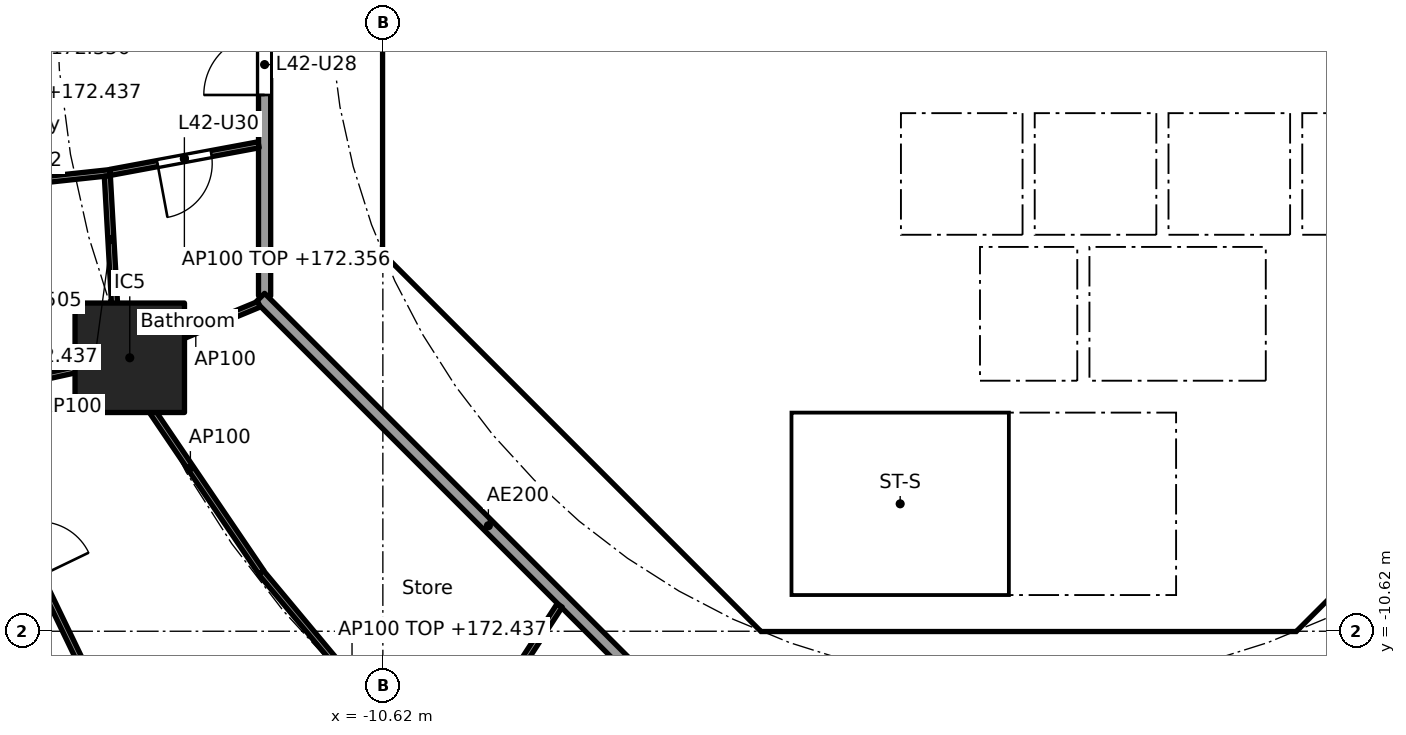
"""IFC4 building model, lengths in metres.
Left out: names, types, materials, properties, quantities, classifications, styles, units other than length and angle.
Written with IfcOpenShell. Run it as: python <this file> out.ifc"""

import sys

from ifc_helpers import new_model, si_unit, direction, frame, frame_2d, origin, origin_2d, place, context, subcontext, project, spatial, polyline, rectangle, outline, extrude, element, fill, save


model = new_model("IFC4")
c1 = context("Model", 3, precision=1e-05, world=origin(), true_north=direction((0.0, 1.0)))
c2 = subcontext(c1, "Body", "Model", "MODEL_VIEW")
j1 = project(units=[si_unit("LENGTHUNIT", "METRE"), si_unit("PLANEANGLEUNIT", "RADIAN")], contexts=[c1])
p1 = place(None, origin())
s1 = spatial("IfcSite", under=j1, at=p1, CompositionType="ELEMENT")
p2 = place(p1, origin())
s2 = spatial("IfcBuilding", under=s1, at=p2, CompositionType="ELEMENT")
p3 = place(p2, frame((0.0, 0.0, 169.6)))
s3 = spatial("IfcBuildingStorey", under=s2, at=p3, CompositionType="ELEMENT", Elevation=169.6)
p4 = place(p3, frame((-14.782, -6.123, 0.0), z_axis=(0.0, 0.0, 1.0), x_axis=(1.0, 0.0, 0.0)))
e1 = element("IfcColumn", 1, at=p4, inside=s3, PredefinedType="COLUMN", context=c2, shape_type="SweptSolid", body=[
    extrude(rectangle(XDim=1.8, YDim=1.8, at=origin_2d()), origin(), (0.0, 0.0, 1.0), 3.7),
])
p5 = place(p3, frame((-10.325, 3.801, 0.0), z_axis=(0.0, 0.0, 1.0), x_axis=(0.0, -1.0, 0.0)))
e2 = element("IfcWall", 2, at=p5, inside=s3, PredefinedType="SHEAR", context=c2, shape_type="SweptSolid", body=[
    extrude(rectangle(XDim=7.602, YDim=0.6, at=frame_2d((3.801, 0.0))), origin(), (0.0, 0.0, 1.0), 3.44),
])
p6 = place(p5, frame((0.651, 0.0, 0.0)))
e3 = element("IfcOpeningElement", 3, at=p6, cuts=e2, PredefinedType="OPENING", context=c2, shape_type="SweptSolid", body=[
    extrude(rectangle(XDim=1.5, YDim=2.1, at=frame_2d((0.75, 1.05))), frame((0.0, 0.31, 0.0), z_axis=(0.0, -1.0, 0.0), x_axis=(1.0, 0.0, 0.0)), (0.0, 0.0, 1.0), 0.62),
])
p7 = place(p5, frame((5.451, 0.0, 0.0)))
e4 = element("IfcOpeningElement", 4, at=p7, cuts=e2, PredefinedType="OPENING", context=c2, shape_type="SweptSolid", body=[
    extrude(rectangle(XDim=1.5, YDim=2.1, at=frame_2d((0.75, 1.05))), frame((0.0, 0.31, 0.0), z_axis=(0.0, -1.0, 0.0), x_axis=(1.0, 0.0, 0.0)), (0.0, 0.0, 1.0), 0.62),
])
p8 = place(p3, frame((-9.988, -4.613, 0.0), z_axis=(0.0, 0.0, 1.0), x_axis=(0.707106781187, -0.707106781187, 0.0)))
e5 = element("IfcWall", 5, at=p8, inside=s3, PredefinedType="SHEAR", context=c2, shape_type="SweptSolid", body=[
    extrude(rectangle(XDim=7.602, YDim=0.6, at=frame_2d((3.801, 0.0))), origin(), (0.0, 0.0, 1.0), 3.44),
])
p9 = place(p8, frame((6.151, 0.0, 0.0)))
e6 = element("IfcOpeningElement", 6, at=p9, cuts=e5, PredefinedType="OPENING", context=c2, shape_type="SweptSolid", body=[
    extrude(rectangle(XDim=1.1, YDim=2.1, at=frame_2d((0.55, 1.05))), frame((0.0, 0.31, 0.0), z_axis=(0.0, -1.0, 0.0), x_axis=(1.0, 0.0, 0.0)), (0.0, 0.0, 1.0), 0.62),
])
p10 = place(p3, frame((4.613, -9.988, 0.0), z_axis=(0.0, 0.0, 1.0), x_axis=(0.707106781187, 0.707106781187, 0.0)))
e7 = element("IfcWall", 7, at=p10, inside=s3, PredefinedType="SHEAR", context=c2, shape_type="SweptSolid", body=[
    extrude(rectangle(XDim=7.602, YDim=0.6, at=frame_2d((3.801, 0.0))), origin(), (0.0, 0.0, 1.0), 3.44),
])
p11 = place(p10, frame((3.201, 0.0, 0.0)))
e8 = element("IfcOpeningElement", 8, at=p11, cuts=e7, PredefinedType="OPENING", context=c2, shape_type="SweptSolid", body=[
    extrude(rectangle(XDim=1.2, YDim=2.1, at=frame_2d((0.6, 1.05))), frame((0.0, 0.31, 0.0), z_axis=(0.0, -1.0, 0.0), x_axis=(1.0, 0.0, 0.0)), (0.0, 0.0, 1.0), 0.62),
])
p12 = place(p3, frame((4.0, -10.025, 0.0), z_axis=(0.0, 0.0, 1.0), x_axis=(0.0, 1.0, 0.0)))
e9 = element("IfcWall", 9, at=p12, inside=s3, PredefinedType="SOLIDWALL", context=c2, shape_type="SweptSolid", body=[
    extrude(rectangle(XDim=3.0, YDim=0.2, at=frame_2d((1.5, 0.0))), origin(), (0.0, 0.0, 1.0), 3.44),
])
p13 = place(p12, frame((0.975, 0.0, 0.0)))
e10 = element("IfcOpeningElement", 10, at=p13, cuts=e9, PredefinedType="OPENING", context=c2, shape_type="SweptSolid", body=[
    extrude(rectangle(XDim=1.1, YDim=2.1, at=frame_2d((0.55, 1.05))), frame((0.0, 0.11, 0.0), z_axis=(0.0, -1.0, 0.0), x_axis=(1.0, 0.0, 0.0)), (0.0, 0.0, 1.0), 0.22),
])
p14 = place(p3, frame((-5.8, -8.227, 0.0), z_axis=(0.0, 0.0, 1.0), x_axis=(0.0, 1.0, 0.0)))
e11 = element("IfcWall", 11, at=p14, inside=s3, PredefinedType="PARTITIONING", context=c2, shape_type="SweptSolid", body=[
    extrude(rectangle(XDim=3.927, YDim=0.15, at=frame_2d((1.963, 0.0))), origin(), (0.0, 0.0, 1.0), 3.44),
])
p15 = place(p14, frame((2.764, 0.0, 0.0)))
e12 = element("IfcOpeningElement", 12, at=p15, cuts=e11, PredefinedType="OPENING", context=c2, shape_type="SweptSolid", body=[
    extrude(rectangle(XDim=0.9, YDim=2.1, at=frame_2d((0.45, 1.05))), frame((0.0, 0.085, 0.0), z_axis=(0.0, -1.0, 0.0), x_axis=(1.0, 0.0, 0.0)), (0.0, 0.0, 1.0), 0.17),
])
p16 = place(p14, frame((0.688, 0.0, 0.0)))
e13 = element("IfcOpeningElement", 13, at=p16, cuts=e11, PredefinedType="OPENING", context=c2, shape_type="SweptSolid", body=[
    extrude(rectangle(XDim=0.9, YDim=2.1, at=frame_2d((0.45, 1.05))), frame((0.0, 0.085, 0.0), z_axis=(0.0, -1.0, 0.0), x_axis=(1.0, 0.0, 0.0)), (0.0, 0.0, 1.0), 0.17),
])
p17 = place(p3, frame((4.0, -6.5, 0.0), z_axis=(0.0, 0.0, 1.0), x_axis=(0.0, 1.0, 0.0)))
e14 = element("IfcWall", 14, at=p17, inside=s3, PredefinedType="SOLIDWALL", context=c2, shape_type="SweptSolid", body=[
    extrude(rectangle(XDim=2.2, YDim=0.2, at=frame_2d((1.1, 0.0))), origin(), (0.0, 0.0, 1.0), 3.44),
])
p18 = place(p17, frame((0.55, 0.0, 0.0)))
e15 = element("IfcOpeningElement", 15, at=p18, cuts=e14, PredefinedType="OPENING", context=c2, shape_type="SweptSolid", body=[
    extrude(rectangle(XDim=1.1, YDim=2.1, at=frame_2d((0.55, 1.05))), frame((0.0, 0.11, 0.0), z_axis=(0.0, -1.0, 0.0), x_axis=(1.0, 0.0, 0.0)), (0.0, 0.0, 1.0), 0.22),
])
p19 = place(p3, frame((-4.0, -6.5, 0.0), z_axis=(0.0, 0.0, 1.0), x_axis=(0.0, 1.0, 0.0)))
e16 = element("IfcWall", 16, at=p19, inside=s3, PredefinedType="SOLIDWALL", context=c2, shape_type="SweptSolid", body=[
    extrude(rectangle(XDim=2.2, YDim=0.2, at=frame_2d((1.1, 0.0))), origin(), (0.0, 0.0, 1.0), 3.44),
])
p20 = place(p19, frame((0.65, 0.0, 0.0)))
e17 = element("IfcOpeningElement", 17, at=p20, cuts=e16, PredefinedType="OPENING", context=c2, shape_type="SweptSolid", body=[
    extrude(rectangle(XDim=0.9, YDim=2.1, at=frame_2d((0.45, 1.05))), frame((0.0, 0.11, 0.0), z_axis=(0.0, -1.0, 0.0), x_axis=(1.0, 0.0, 0.0)), (0.0, 0.0, 1.0), 0.22),
])
p21 = place(p3, frame((-6.7, -2.0, 0.0), z_axis=(0.0, 0.0, 1.0), x_axis=(1.0, 0.0, 0.0)))
e18 = element("IfcWall", 18, at=p21, inside=s3, PredefinedType="SOLIDWALL", context=c2, shape_type="SweptSolid", body=[
    extrude(rectangle(XDim=13.4, YDim=0.2, at=frame_2d((6.7, 0.0))), origin(), (0.0, 0.0, 1.0), 3.44),
])
p22 = place(p21, frame((5.05, 0.0, 0.0)))
e19 = element("IfcOpeningElement", 19, at=p22, cuts=e18, PredefinedType="OPENING", context=c2, shape_type="SweptSolid", body=[
    extrude(rectangle(XDim=1.1, YDim=2.1, at=frame_2d((0.55, 1.05))), frame((0.0, 0.11, 0.0), z_axis=(0.0, -1.0, 0.0), x_axis=(1.0, 0.0, 0.0)), (0.0, 0.0, 1.0), 0.22),
])
p23 = place(p21, frame((7.25, 0.0, 0.0)))
e20 = element("IfcOpeningElement", 20, at=p23, cuts=e18, PredefinedType="OPENING", context=c2, shape_type="SweptSolid", body=[
    extrude(rectangle(XDim=1.1, YDim=2.1, at=frame_2d((0.55, 1.05))), frame((0.0, 0.11, 0.0), z_axis=(0.0, -1.0, 0.0), x_axis=(1.0, 0.0, 0.0)), (0.0, 0.0, 1.0), 0.22),
])
p24 = place(p21, frame((1.85, 0.0, 0.0)))
e21 = element("IfcOpeningElement", 21, at=p24, cuts=e18, PredefinedType="OPENING", context=c2, shape_type="SweptSolid", body=[
    extrude(rectangle(XDim=0.9, YDim=2.1, at=frame_2d((0.45, 1.05))), frame((0.0, 0.11, 0.0), z_axis=(0.0, -1.0, 0.0), x_axis=(1.0, 0.0, 0.0)), (0.0, 0.0, 1.0), 0.22),
])
p25 = place(p3, origin())
e22 = element("IfcWall", 22, at=p25, inside=s3, PredefinedType="SHEAR", context=c2, shape_type="SweptSolid", body=[
    extrude(outline(polyline([(-10.625, -3.801), (-10.025, -3.801), (-10.025, -4.152), (-9.776, -4.401), (-10.2, -4.825), (-10.625, -4.401), (-10.625, -3.801)])), origin(), (0.0, 0.0, 1.0), 3.44),
])
p26 = place(p3, origin())
e23 = element("IfcWall", 23, at=p26, inside=s3, PredefinedType="SHEAR", context=c2, shape_type="SweptSolid", body=[
    extrude(outline(polyline([(-4.152, -10.025), (4.152, -10.025), (4.401, -9.776), (4.825, -10.2), (4.401, -10.625), (-4.401, -10.625), (-4.825, -10.2), (-4.401, -9.776), (-4.152, -10.025)])), origin(), (0.0, 0.0, 1.0), 3.44),
])
for number, where, z_axis, x_axis in (
    (24, (-0.9, -6.5, 0.0), (0.0, 0.0, 1.0), (0.0, 1.0, 0.0)),
    (25, (0.9, -6.5, 0.0), (0.0, 0.0, 1.0), (0.0, 1.0, 0.0)),
):
    element("IfcWall", number, at=place(p3, frame(where, z_axis=z_axis, x_axis=x_axis)), inside=s3, PredefinedType="SOLIDWALL", context=c2, shape_type="SweptSolid", body=[
        extrude(rectangle(XDim=2.2, YDim=0.2, at=frame_2d((1.1, 0.0))), origin(), (0.0, 0.0, 1.0), 3.44),
    ])
p27 = place(p3, origin())
e26 = element("IfcWall", 26, at=p27, inside=s3, PredefinedType="SOLIDWALL", context=c2, shape_type="SweptSolid", body=[
    extrude(outline(polyline([(-6.7, -2.1), (-6.5, -2.1), (-6.5, -4.1), (-2.3, -4.1), (-2.3, -2.1), (-2.1, -2.1), (-2.1, -4.1), (-0.1, -4.1), (-0.1, -2.1), (0.1, -2.1), (0.1, -4.1), (2.1, -4.1), (2.1, -2.1), (2.3, -2.1), (2.3, -4.1), (4.3, -4.1), (4.3, -2.1), (4.5, -2.1), (4.5, -4.1), (6.5, -4.1), (6.5, -2.1), (6.7, -2.1), (6.7, -4.3), (-6.7, -4.3), (-6.7, -2.1)])), origin(), (0.0, 0.0, 1.0), 3.44),
])
p28 = place(p3, frame((-10.025, -4.0, 0.0), z_axis=(0.0, 0.0, 1.0), x_axis=(1.0, 0.0, 0.0)))
e27 = element("IfcWall", 27, at=p28, inside=s3, PredefinedType="PARTITIONING", context=c2, shape_type="SweptSolid", body=[
    extrude(rectangle(XDim=3.325, YDim=0.2, at=frame_2d((1.662, 0.0))), origin(), (0.0, 0.0, 1.0), 3.44),
])
p29 = place(p3, frame((-8.301, -5.8, 0.0), z_axis=(0.0, 0.0, 1.0), x_axis=(1.0, 0.0, 0.0)))
e28 = element("IfcWall", 28, at=p29, inside=s3, PredefinedType="PARTITIONING", context=c2, shape_type="SweptSolid", body=[
    extrude(rectangle(XDim=2.426, YDim=0.15, at=frame_2d((1.213, 0.0))), origin(), (0.0, 0.0, 1.0), 3.44),
])
p30 = place(p3, origin())
e29 = element("IfcWall", 29, at=p30, inside=s3, PredefinedType="SOLIDWALL", context=c2, shape_type="SweptSolid", body=[
    extrude(outline(polyline([(-3.9, -10.025), (-4.1, -10.025), (-4.1, -7.025), (-3.9, -7.025), (-3.9, -10.025)])), origin(), (0.0, 0.0, 1.0), 3.44),
])
p31 = place(p3, origin())
e30 = element("IfcWall", 30, at=p31, inside=s3, PredefinedType="SOLIDWALL", context=c2, shape_type="SweptSolid", body=[
    extrude(outline(polyline([(4.1, -7.025), (-4.1, -7.025), (-4.1, -6.5), (4.1, -6.5), (4.1, -7.025)])), origin(), (0.0, 0.0, 1.0), 3.44),
])
p32 = place(p3, frame((-12.565, 5.304, 0.0), z_axis=(0.0, 0.0, 1.0), x_axis=(0.0, -1.0, 0.0)))
e31 = element("IfcWall", 31, at=p32, inside=s3, PredefinedType="PARTITIONING", context=c2, shape_type="SweptSolid", body=[
    extrude(rectangle(XDim=10.409, YDim=0.2, at=frame_2d((5.205, 0.0))), origin(), (0.0, 0.0, 1.0), 3.44),
])
p33 = place(p32, frame((6.106, 0.0, 0.0)))
e32 = element("IfcOpeningElement", 32, at=p33, cuts=e31, PredefinedType="OPENING", context=c2, shape_type="SweptSolid", body=[
    extrude(rectangle(XDim=1.0, YDim=2.1, at=frame_2d((0.5, 1.05))), frame((0.0, 0.11, 0.0), z_axis=(0.0, -1.0, 0.0), x_axis=(1.0, 0.0, 0.0)), (0.0, 0.0, 1.0), 0.22),
])
p34 = place(p3, frame((-12.635, -5.134, 0.0), z_axis=(0.0, 0.0, 1.0), x_axis=(0.707106781187, -0.707106781187, 0.0)))
e33 = element("IfcWall", 33, at=p34, inside=s3, PredefinedType="PARTITIONING", context=c2, shape_type="SweptSolid", body=[
    extrude(rectangle(XDim=10.609, YDim=0.2, at=frame_2d((5.305, 0.0))), origin(), (0.0, 0.0, 1.0), 3.44),
])
p35 = place(p3, frame((-12.663, -2.621, 0.0), z_axis=(0.0, 0.0, 1.0), x_axis=(-0.983176884312, -0.182655999505, 0.0)))
e34 = element("IfcWall", 34, at=p35, inside=s3, PredefinedType="PARTITIONING", context=c2, shape_type="SweptSolid", body=[
    extrude(rectangle(XDim=2.483, YDim=0.1, at=frame_2d((1.242, 0.0))), origin(), (0.0, 0.0, 1.0), 2.756),
])
p36 = place(p35, frame((0.792, 0.0, 0.0)))
e35 = element("IfcOpeningElement", 35, at=p36, cuts=e34, PredefinedType="OPENING", context=c2, shape_type="SweptSolid", body=[
    extrude(rectangle(XDim=0.9, YDim=2.1, at=frame_2d((0.45, 1.05))), frame((0.0, 0.06, 0.0), z_axis=(0.0, -1.0, 0.0), x_axis=(1.0, 0.0, 0.0)), (0.0, 0.0, 1.0), 0.12),
])
p37 = place(p3, frame((-15.104, -3.078, 0.0), z_axis=(0.0, 0.0, 1.0), x_axis=(-0.994316167803, -0.106467640365, 0.0)))
e36 = element("IfcWall", 36, at=p37, inside=s3, PredefinedType="PARTITIONING", context=c2, shape_type="SweptSolid", body=[
    extrude(rectangle(XDim=6.45, YDim=0.1, at=frame_2d((3.225, 0.0))), origin(), (0.0, 0.0, 1.0), 2.905),
])
p38 = place(p37, frame((1.022, 0.0, 0.0)))
e37 = element("IfcOpeningElement", 37, at=p38, cuts=e36, PredefinedType="OPENING", context=c2, shape_type="SweptSolid", body=[
    extrude(rectangle(XDim=0.9, YDim=2.1, at=frame_2d((0.45, 1.05))), frame((0.0, 0.06, 0.0), z_axis=(0.0, -1.0, 0.0), x_axis=(1.0, 0.0, 0.0)), (0.0, 0.0, 1.0), 0.12),
])
p39 = place(p37, frame((4.223, 0.0, 0.0)))
e38 = element("IfcOpeningElement", 38, at=p39, cuts=e36, PredefinedType="OPENING", context=c2, shape_type="SweptSolid", body=[
    extrude(rectangle(XDim=0.9, YDim=2.1, at=frame_2d((0.45, 1.05))), frame((0.0, 0.06, 0.0), z_axis=(0.0, -1.0, 0.0), x_axis=(1.0, 0.0, 0.0)), (0.0, 0.0, 1.0), 0.12),
])
p40 = place(p3, frame((-15.151, -3.133, 0.0), z_axis=(0.0, 0.0, 1.0), x_axis=(0.05637501378, -0.998409664327, 0.0)))
e39 = element("IfcWall", 39, at=p40, inside=s3, PredefinedType="PARTITIONING", context=c2, shape_type="SweptSolid", body=[
    extrude(rectangle(XDim=2.988, YDim=0.1, at=frame_2d((1.494, 0.0))), origin(), (0.0, 0.0, 1.0), 2.837),
])
p41 = place(p3, frame((-12.657, -5.243, 0.0), z_axis=(0.0, 0.0, 1.0), x_axis=(-0.923848837015, -0.382757529444, 0.0)))
e40 = element("IfcWall", 40, at=p41, inside=s3, PredefinedType="PARTITIONING", context=c2, shape_type="SweptSolid", body=[
    extrude(rectangle(XDim=2.25, YDim=0.1, at=frame_2d((1.125, 0.0))), origin(), (0.0, 0.0, 1.0), 3.44),
])
p42 = place(p3, frame((-14.831, -6.134, 0.0), z_axis=(0.0, 0.0, 1.0), x_axis=(-0.976560749847, -0.215241961191, 0.0)))
e41 = element("IfcWall", 41, at=p42, inside=s3, PredefinedType="PARTITIONING", context=c2, shape_type="SweptSolid", body=[
    extrude(rectangle(XDim=2.879, YDim=0.1, at=frame_2d((1.439, 0.0))), origin(), (0.0, 0.0, 1.0), 3.44),
])
p43 = place(p3, frame((-14.952, -6.208, 0.0), z_axis=(0.0, 0.0, 1.0), x_axis=(0.561064907171, -0.827771810308, 0.0)))
e42 = element("IfcWall", 42, at=p43, inside=s3, PredefinedType="PARTITIONING", context=c2, shape_type="SweptSolid", body=[
    extrude(rectangle(XDim=4.159, YDim=0.1, at=frame_2d((2.079, 0.0))), origin(), (0.0, 0.0, 1.0), 3.44),
])
p44 = place(p3, frame((-17.669, -6.809, 0.0), z_axis=(0.0, 0.0, 1.0), x_axis=(0.434040130629, -0.900893536997, 0.0)))
e43 = element("IfcWall", 43, at=p44, inside=s3, PredefinedType="PARTITIONING", context=c2, shape_type="SweptSolid", body=[
    extrude(rectangle(XDim=5.558, YDim=0.1, at=frame_2d((2.779, 0.0))), origin(), (0.0, 0.0, 1.0), 3.44),
])
p45 = place(p44, frame((2.329, 0.0, 0.0)))
e44 = element("IfcOpeningElement", 44, at=p45, cuts=e43, PredefinedType="OPENING", context=c2, shape_type="SweptSolid", body=[
    extrude(rectangle(XDim=0.9, YDim=2.1, at=frame_2d((0.45, 1.05))), frame((0.0, 0.06, 0.0), z_axis=(0.0, -1.0, 0.0), x_axis=(1.0, 0.0, 0.0)), (0.0, 0.0, 1.0), 0.12),
])
p46 = place(p3, frame((-12.623, -9.653, 0.0), z_axis=(0.0, 0.0, 1.0), x_axis=(0.640297481347, -0.768127030758, 0.0)))
e45 = element("IfcWall", 45, at=p46, inside=s3, PredefinedType="PARTITIONING", context=c2, shape_type="SweptSolid", body=[
    extrude(rectangle(XDim=4.672, YDim=0.1, at=frame_2d((2.336, 0.0))), origin(), (0.0, 0.0, 1.0), 2.837),
])
p47 = place(p46, frame((3.029, 0.0, 0.0)))
e46 = element("IfcOpeningElement", 46, at=p47, cuts=e45, PredefinedType="OPENING", context=c2, shape_type="SweptSolid", body=[
    extrude(rectangle(XDim=0.9, YDim=2.1, at=frame_2d((0.45, 1.05))), frame((0.0, 0.06, 0.0), z_axis=(0.0, -1.0, 0.0), x_axis=(1.0, 0.0, 0.0)), (0.0, 0.0, 1.0), 0.12),
])
p48 = place(p3, frame((-7.712, -10.195, 0.0), z_axis=(0.0, 0.0, 1.0), x_axis=(-0.544170086001, -0.838974920663, 0.0)))
e47 = element("IfcWall", 47, at=p48, inside=s3, PredefinedType="PARTITIONING", context=c2, shape_type="SweptSolid", body=[
    extrude(rectangle(XDim=3.535, YDim=0.1, at=frame_2d((1.768, 0.0))), origin(), (0.0, 0.0, 1.0), 2.756),
])
p49 = place(p22, origin())
e48 = element("IfcDoor", 48, at=p49, inside=s3, OperationType="DOUBLE_DOOR_SLIDING", PredefinedType="DOOR", context=c2, shape_type="SweptSolid", body=[
    extrude(rectangle(XDim=1.1, YDim=2.1, at=frame_2d((0.55, 1.05))), frame((0.0, 0.025, 0.0), z_axis=(0.0, -1.0, 0.0), x_axis=(1.0, 0.0, 0.0)), (0.0, 0.0, 1.0), 0.05),
])
fill(e19, e48)
p50 = place(p23, origin())
e49 = element("IfcDoor", 49, at=p50, inside=s3, OperationType="DOUBLE_DOOR_SLIDING", PredefinedType="DOOR", context=c2, shape_type="SweptSolid", body=[
    extrude(rectangle(XDim=1.1, YDim=2.1, at=frame_2d((0.55, 1.05))), frame((0.0, 0.025, 0.0), z_axis=(0.0, -1.0, 0.0), x_axis=(1.0, 0.0, 0.0)), (0.0, 0.0, 1.0), 0.05),
])
fill(e20, e49)
p51 = place(p18, origin())
e50 = element("IfcDoor", 50, at=p51, inside=s3, OperationType="DOUBLE_DOOR_SLIDING", PredefinedType="DOOR", context=c2, shape_type="SweptSolid", body=[
    extrude(rectangle(XDim=1.1, YDim=2.1, at=frame_2d((0.55, 1.05))), frame((0.0, 0.025, 0.0), z_axis=(0.0, -1.0, 0.0), x_axis=(1.0, 0.0, 0.0)), (0.0, 0.0, 1.0), 0.05),
])
fill(e15, e50)
p52 = place(p13, origin())
e51 = element("IfcDoor", 51, at=p52, inside=s3, OperationType="SINGLE_SWING_RIGHT", PredefinedType="DOOR", context=c2, shape_type="SweptSolid", body=[
    extrude(rectangle(XDim=1.1, YDim=2.1, at=frame_2d((0.55, 1.05))), frame((0.0, 0.025, 0.0), z_axis=(0.0, -1.0, 0.0), x_axis=(1.0, 0.0, 0.0)), (0.0, 0.0, 1.0), 0.05),
])
fill(e10, e51)
p53 = place(p15, origin())
e52 = element("IfcDoor", 52, at=p53, inside=s3, OperationType="SINGLE_SWING_RIGHT", PredefinedType="DOOR", context=c2, shape_type="SweptSolid", body=[
    extrude(rectangle(XDim=0.9, YDim=2.1, at=frame_2d((0.45, 1.05))), frame((0.0, 0.025, 0.0), z_axis=(0.0, -1.0, 0.0), x_axis=(1.0, 0.0, 0.0)), (0.0, 0.0, 1.0), 0.05),
])
fill(e12, e52)
p54 = place(p16, origin())
e53 = element("IfcDoor", 53, at=p54, inside=s3, OperationType="SINGLE_SWING_RIGHT", PredefinedType="DOOR", context=c2, shape_type="SweptSolid", body=[
    extrude(rectangle(XDim=0.9, YDim=2.1, at=frame_2d((0.45, 1.05))), frame((0.0, 0.025, 0.0), z_axis=(0.0, -1.0, 0.0), x_axis=(1.0, 0.0, 0.0)), (0.0, 0.0, 1.0), 0.05),
])
fill(e13, e53)
p55 = place(p20, frame((0.9, 0.0, 0.0), x_axis=(-1.0, 0.0, 0.0)))
e54 = element("IfcDoor", 54, at=p55, inside=s3, OperationType="SINGLE_SWING_LEFT", PredefinedType="DOOR", context=c2, shape_type="SweptSolid", body=[
    extrude(rectangle(XDim=0.9, YDim=2.1, at=frame_2d((0.45, 1.05))), frame((0.0, 0.025, 0.0), z_axis=(0.0, -1.0, 0.0), x_axis=(1.0, 0.0, 0.0)), (0.0, 0.0, 1.0), 0.05),
])
fill(e17, e54)
p56 = place(p24, frame((0.9, 0.0, 0.0), x_axis=(-1.0, 0.0, 0.0)))
e55 = element("IfcDoor", 55, at=p56, inside=s3, OperationType="SINGLE_SWING_RIGHT", PredefinedType="DOOR", context=c2, shape_type="SweptSolid", body=[
    extrude(rectangle(XDim=0.9, YDim=2.1, at=frame_2d((0.45, 1.05))), frame((0.0, 0.025, 0.0), z_axis=(0.0, -1.0, 0.0), x_axis=(1.0, 0.0, 0.0)), (0.0, 0.0, 1.0), 0.05),
])
fill(e21, e55)
p57 = place(p7, origin())
e56 = element("IfcDoor", 56, at=p57, inside=s3, OperationType="DOUBLE_DOOR_SINGLE_SWING", PredefinedType="DOOR", context=c2, shape_type="SweptSolid", body=[
    extrude(rectangle(XDim=1.5, YDim=2.1, at=frame_2d((0.75, 1.05))), frame((0.0, 0.025, 0.0), z_axis=(0.0, -1.0, 0.0), x_axis=(1.0, 0.0, 0.0)), (0.0, 0.0, 1.0), 0.05),
])
fill(e4, e56)
p58 = place(p9, origin())
e57 = element("IfcDoor", 57, at=p58, inside=s3, OperationType="SINGLE_SWING_RIGHT", PredefinedType="DOOR", context=c2, shape_type="SweptSolid", body=[
    extrude(rectangle(XDim=1.1, YDim=2.1, at=frame_2d((0.55, 1.05))), frame((0.0, 0.025, 0.0), z_axis=(0.0, -1.0, 0.0), x_axis=(1.0, 0.0, 0.0)), (0.0, 0.0, 1.0), 0.05),
])
fill(e6, e57)
p59 = place(p33, frame((1.0, 0.0, 0.0), x_axis=(-1.0, 0.0, 0.0)))
e58 = element("IfcDoor", 58, at=p59, inside=s3, OperationType="SINGLE_SWING_LEFT", PredefinedType="DOOR", context=c2, shape_type="SweptSolid", body=[
    extrude(rectangle(XDim=1.0, YDim=2.1, at=frame_2d((0.5, 1.05))), frame((0.0, 0.025, 0.0), z_axis=(0.0, -1.0, 0.0), x_axis=(1.0, 0.0, 0.0)), (0.0, 0.0, 1.0), 0.05),
])
fill(e32, e58)
p60 = place(p36, origin())
e59 = element("IfcDoor", 59, at=p60, inside=s3, OperationType="SINGLE_SWING_RIGHT", PredefinedType="DOOR", context=c2, shape_type="SweptSolid", body=[
    extrude(rectangle(XDim=0.9, YDim=2.1, at=frame_2d((0.45, 1.05))), frame((0.0, 0.025, 0.0), z_axis=(0.0, -1.0, 0.0), x_axis=(1.0, 0.0, 0.0)), (0.0, 0.0, 1.0), 0.05),
])
fill(e35, e59)
save(model, sys.argv[1])
